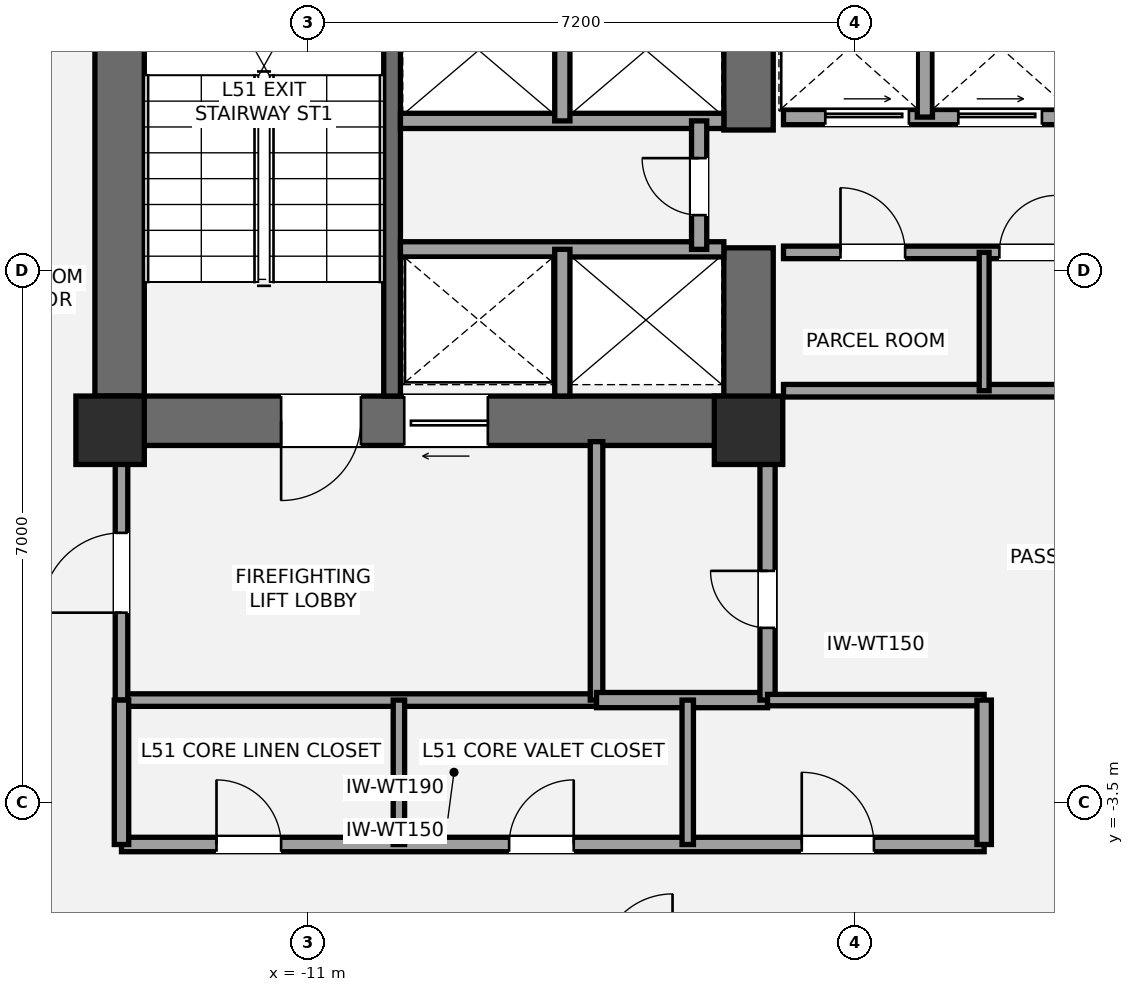
"""IFC4 building model, lengths in metres.
Left out: names, types, materials, properties, quantities, classifications, styles, units other than length and angle.
Written with IfcOpenShell. Run it as: python <this file> out.ifc"""

import sys

from ifc_helpers import new_model, si_unit, direction, frame, frame_2d, origin, origin_2d, place, context, subcontext, project, spatial, rectangle, extrude, element, fill, save


model = new_model("IFC4")
c1 = context("Model", 3, precision=1e-05, world=origin(), true_north=direction((0.0, 1.0)))
c2 = subcontext(c1, "Body", "Model", "MODEL_VIEW")
j1 = project(units=[si_unit("LENGTHUNIT", "METRE"), si_unit("PLANEANGLEUNIT", "RADIAN")], contexts=[c1])
p1 = place(None, origin())
s1 = spatial("IfcSite", under=j1, at=p1, CompositionType="ELEMENT")
p2 = place(p1, origin())
s2 = spatial("IfcBuilding", under=s1, at=p2, CompositionType="ELEMENT")
p3 = place(p2, frame((0.0, 0.0, 185.4)))
s3 = spatial("IfcBuildingStorey", under=s2, at=p3, CompositionType="ELEMENT", Elevation=185.4)
p4 = place(p3, frame((-13.475, 1.2, 0.0), z_axis=(0.0, 0.0, 1.0), x_axis=(0.0, 1.0, 0.0)))
e1 = element("IfcWall", 1, at=p4, inside=s3, PredefinedType="SHEAR", context=c2, shape_type="SweptSolid", body=[
    extrude(rectangle(XDim=8.45, YDim=0.65, at=frame_2d((4.225, 0.0))), origin(), (0.0, 0.0, 1.0), 3.2),
])
p5 = place(p3, frame((-4.875, 1.525, 0.0), z_axis=(0.0, 0.0, 1.0), x_axis=(-1.0, 0.0, 0.0)))
e2 = element("IfcWall", 2, at=p5, inside=s3, PredefinedType="SHEAR", context=c2, shape_type="SweptSolid", body=[
    extrude(rectangle(XDim=8.925, YDim=0.65, at=frame_2d((4.462, 0.0))), origin(), (0.0, 0.0, 1.0), 3.2),
])
p6 = place(p5, frame((5.425, 0.0, 0.0)))
e3 = element("IfcOpeningElement", 3, at=p6, cuts=e2, PredefinedType="OPENING", context=c2, shape_type="SweptSolid", body=[
    extrude(rectangle(XDim=1.05, YDim=2.15, at=frame_2d((0.525, 1.075))), frame((0.0, 0.335, 0.0), z_axis=(0.0, -1.0, 0.0), x_axis=(1.0, 0.0, 0.0)), (0.0, 0.0, 1.0), 0.67),
])
p7 = place(p5, frame((3.755, 0.0, 0.0)))
e4 = element("IfcOpeningElement", 4, at=p7, cuts=e2, PredefinedType="OPENING", context=c2, shape_type="SweptSolid", body=[
    extrude(rectangle(XDim=1.1, YDim=2.2, at=frame_2d((0.55, 1.1))), frame((0.0, 0.335, 0.0), z_axis=(0.0, -1.0, 0.0), x_axis=(1.0, 0.0, 0.0)), (0.0, 0.0, 1.0), 0.67),
])
p8 = place(p3, frame((-5.2, 1.2, 0.0), z_axis=(0.0, 0.0, 1.0), x_axis=(0.0, 1.0, 0.0)))
e5 = element("IfcWall", 5, at=p8, inside=s3, PredefinedType="SHEAR", context=c2, shape_type="SweptSolid", body=[
    extrude(rectangle(XDim=2.6, YDim=0.65, at=frame_2d((1.3, 0.0))), origin(), (0.0, 0.0, 1.0), 3.2),
])
p9 = place(p3, frame((-5.2, 5.35, 0.0), z_axis=(0.0, 0.0, 1.0), x_axis=(0.0, 1.0, 0.0)))
e6 = element("IfcWall", 6, at=p9, inside=s3, PredefinedType="SHEAR", context=c2, shape_type="SweptSolid", body=[
    extrude(rectangle(XDim=2.0, YDim=0.65, at=frame_2d((1.0, 0.0))), origin(), (0.0, 0.0, 1.0), 3.2),
])
p10 = place(p3, frame((-9.89, 1.85, 0.0), z_axis=(0.0, 0.0, 1.0), x_axis=(0.0, 1.0, 0.0)))
e7 = element("IfcWall", 7, at=p10, inside=s3, PredefinedType="SHEAR", context=c2, shape_type="SweptSolid", body=[
    extrude(rectangle(XDim=7.15, YDim=0.22, at=frame_2d((3.575, 0.0))), origin(), (0.0, 0.0, 1.0), 3.2),
])
for number, where, z_axis, x_axis in (
    (8, (-13.6, 1.4, 0.0), (0.0, 0.0, 1.0), (1.0, 0.0, 0.0)),
    (9, (-5.2, 1.4, 0.0), (0.0, 0.0, 1.0), (1.0, 0.0, 0.0)),
):
    element("IfcColumn", number, at=place(p3, frame(where, z_axis=z_axis, x_axis=x_axis)), inside=s3, PredefinedType="COLUMN", context=c2, shape_type="SweptSolid", body=[
        extrude(rectangle(XDim=0.9, YDim=0.9, at=origin_2d()), origin(), (0.0, 0.0, 1.0), 3.2),
    ])
p11 = place(p3, frame((-13.45, -2.15, 0.0), z_axis=(0.0, 0.0, 1.0), x_axis=(1.0, 0.0, 0.0)))
e10 = element("IfcWall", 10, at=p11, inside=s3, PredefinedType="PARTITIONING", context=c2, shape_type="SweptSolid", body=[
    extrude(rectangle(XDim=6.25, YDim=0.165, at=frame_2d((3.125, 0.0))), origin(), (0.0, 0.0, 1.0), 3.02),
])
p12 = place(p3, frame((-13.45, -2.15, 0.0), z_axis=(0.0, 0.0, 1.0), x_axis=(0.0, 1.0, 0.0)))
e11 = element("IfcWall", 11, at=p12, inside=s3, PredefinedType="PARTITIONING", context=c2, shape_type="SweptSolid", body=[
    extrude(rectangle(XDim=3.4, YDim=0.165, at=frame_2d((1.7, 0.0))), origin(), (0.0, 0.0, 1.0), 2.473),
])
p13 = place(p12, frame((1.15, 0.0, 0.0)))
e12 = element("IfcOpeningElement", 12, at=p13, cuts=e11, PredefinedType="OPENING", context=c2, shape_type="SweptSolid", body=[
    extrude(rectangle(XDim=1.05, YDim=2.15, at=frame_2d((0.525, 1.075))), frame((0.0, 0.093, 0.0), z_axis=(0.0, -1.0, 0.0), x_axis=(1.0, 0.0, 0.0)), (0.0, 0.0, 1.0), 0.185),
])
p14 = place(p3, frame((-7.2, -2.15, 0.0), z_axis=(0.0, 0.0, 1.0), x_axis=(0.0, 1.0, 0.0)))
e13 = element("IfcWall", 13, at=p14, inside=s3, PredefinedType="PARTITIONING", context=c2, shape_type="SweptSolid", body=[
    extrude(rectangle(XDim=3.4, YDim=0.165, at=frame_2d((1.7, 0.0))), origin(), (0.0, 0.0, 1.0), 2.473),
])
p15 = place(p3, frame((-7.2, -2.15, 0.0), z_axis=(0.0, 0.0, 1.0), x_axis=(1.0, 0.0, 0.0)))
e14 = element("IfcWall", 14, at=p15, inside=s3, PredefinedType="SOLIDWALL", context=c2, shape_type="SweptSolid", body=[
    extrude(rectangle(XDim=2.25, YDim=0.2, at=frame_2d((1.125, 0.0))), origin(), (0.0, 0.0, 1.0), 3.02),
])
p16 = place(p3, frame((-4.95, -2.15, 0.0), z_axis=(0.0, 0.0, 1.0), x_axis=(0.0, 1.0, 0.0)))
e15 = element("IfcWall", 15, at=p16, inside=s3, PredefinedType="SOLIDWALL", context=c2, shape_type="SweptSolid", body=[
    extrude(rectangle(XDim=3.4, YDim=0.2, at=frame_2d((1.7, 0.0))), origin(), (0.0, 0.0, 1.0), 2.473),
])
p17 = place(p16, frame((0.95, 0.0, 0.0)))
e16 = element("IfcOpeningElement", 16, at=p17, cuts=e15, PredefinedType="OPENING", context=c2, shape_type="SweptSolid", body=[
    extrude(rectangle(XDim=0.75, YDim=2.1, at=frame_2d((0.375, 1.05))), frame((0.0, 0.11, 0.0), z_axis=(0.0, -1.0, 0.0), x_axis=(1.0, 0.0, 0.0)), (0.0, 0.0, 1.0), 0.22),
])
p18 = place(p3, frame((-9.78, 3.78, 0.0), z_axis=(0.0, 0.0, 1.0), x_axis=(1.0, 0.0, 0.0)))
e17 = element("IfcWall", 17, at=p18, inside=s3, PredefinedType="SOLIDWALL", context=c2, shape_type="SweptSolid", body=[
    extrude(rectangle(XDim=4.255, YDim=0.2, at=frame_2d((2.127, 0.0))), origin(), (0.0, 0.0, 1.0), 3.02),
])
p19 = place(p3, frame((-7.65, 1.85, 0.0), z_axis=(0.0, 0.0, 1.0), x_axis=(0.0, 1.0, 0.0)))
e18 = element("IfcWall", 18, at=p19, inside=s3, PredefinedType="SOLIDWALL", context=c2, shape_type="SweptSolid", body=[
    extrude(rectangle(XDim=1.93, YDim=0.2, at=frame_2d((0.965, 0.0))), origin(), (0.0, 0.0, 1.0), 3.02),
])
p20 = place(p3, frame((-9.78, 5.47, 0.0), z_axis=(0.0, 0.0, 1.0), x_axis=(1.0, 0.0, 0.0)))
e19 = element("IfcWall", 19, at=p20, inside=s3, PredefinedType="SOLIDWALL", context=c2, shape_type="SweptSolid", body=[
    extrude(rectangle(XDim=4.255, YDim=0.2, at=frame_2d((2.127, 0.0))), origin(), (0.0, 0.0, 1.0), 3.02),
])
p21 = place(p3, frame((-7.65, 5.47, 0.0), z_axis=(0.0, 0.0, 1.0), x_axis=(0.0, 1.0, 0.0)))
e20 = element("IfcWall", 20, at=p21, inside=s3, PredefinedType="SOLIDWALL", context=c2, shape_type="SweptSolid", body=[
    extrude(rectangle(XDim=1.86, YDim=0.2, at=frame_2d((0.93, 0.0))), origin(), (0.0, 0.0, 1.0), 3.02),
])
p22 = place(p3, frame((-5.85, 3.78, 0.0), z_axis=(0.0, 0.0, 1.0), x_axis=(0.0, 1.0, 0.0)))
e21 = element("IfcWall", 21, at=p22, inside=s3, PredefinedType="SOLIDWALL", context=c2, shape_type="SweptSolid", body=[
    extrude(rectangle(XDim=1.69, YDim=0.2, at=frame_2d((0.845, 0.0))), origin(), (0.0, 0.0, 1.0), 3.02),
])
p23 = place(p22, frame((0.45, 0.0, 0.0)))
e22 = element("IfcOpeningElement", 22, at=p23, cuts=e21, PredefinedType="OPENING", context=c2, shape_type="SweptSolid", body=[
    extrude(rectangle(XDim=0.75, YDim=2.1, at=frame_2d((0.375, 1.05))), frame((0.0, 0.11, 0.0), z_axis=(0.0, -1.0, 0.0), x_axis=(1.0, 0.0, 0.0)), (0.0, 0.0, 1.0), 0.22),
])
p24 = place(p3, frame((-4.74, 1.92, 0.0), z_axis=(0.0, 0.0, 1.0), x_axis=(1.0, 0.0, 0.0)))
e23 = element("IfcWall", 23, at=p24, inside=s3, PredefinedType="PARTITIONING", context=c2, shape_type="SweptSolid", body=[
    extrude(rectangle(XDim=3.89, YDim=0.165, at=frame_2d((1.945, 0.0))), origin(), (0.0, 0.0, 1.0), 2.16),
])
p25 = place(p3, frame((-4.74, 3.74, 0.0), z_axis=(0.0, 0.0, 1.0), x_axis=(1.0, 0.0, 0.0)))
e24 = element("IfcWall", 24, at=p25, inside=s3, PredefinedType="PARTITIONING", context=c2, shape_type="SweptSolid", body=[
    extrude(rectangle(XDim=3.89, YDim=0.165, at=frame_2d((1.945, 0.0))), origin(), (0.0, 0.0, 1.0), 3.02),
])
p26 = place(p25, frame((0.75, 0.0, 0.0)))
e25 = element("IfcOpeningElement", 25, at=p26, cuts=e24, PredefinedType="OPENING", context=c2, shape_type="SweptSolid", body=[
    extrude(rectangle(XDim=0.85, YDim=2.1, at=frame_2d((0.425, 1.05))), frame((0.0, 0.093, 0.0), z_axis=(0.0, -1.0, 0.0), x_axis=(1.0, 0.0, 0.0)), (0.0, 0.0, 1.0), 0.185),
])
p27 = place(p25, frame((2.84, 0.0, 0.0)))
e26 = element("IfcOpeningElement", 26, at=p27, cuts=e24, PredefinedType="OPENING", context=c2, shape_type="SweptSolid", body=[
    extrude(rectangle(XDim=0.75, YDim=2.1, at=frame_2d((0.375, 1.05))), frame((0.0, 0.093, 0.0), z_axis=(0.0, -1.0, 0.0), x_axis=(1.0, 0.0, 0.0)), (0.0, 0.0, 1.0), 0.185),
])
p28 = place(p3, frame((-2.1, 1.92, 0.0), z_axis=(0.0, 0.0, 1.0), x_axis=(0.0, 1.0, 0.0)))
e27 = element("IfcWall", 27, at=p28, inside=s3, PredefinedType="PARTITIONING", context=c2, shape_type="SweptSolid", body=[
    extrude(rectangle(XDim=1.82, YDim=0.13, at=frame_2d((0.91, 0.0))), origin(), (0.0, 0.0, 1.0), 3.02),
])
p29 = place(p3, frame((-4.74, 5.52, 0.0), z_axis=(0.0, 0.0, 1.0), x_axis=(1.0, 0.0, 0.0)))
e28 = element("IfcWall", 28, at=p29, inside=s3, PredefinedType="SOLIDWALL", context=c2, shape_type="SweptSolid", body=[
    extrude(rectangle(XDim=3.86, YDim=0.2, at=frame_2d((1.93, 0.0))), origin(), (0.0, 0.0, 1.0), 3.02),
])
p30 = place(p29, frame((0.55, 0.0, 0.0)))
e29 = element("IfcOpeningElement", 29, at=p30, cuts=e28, PredefinedType="OPENING", context=c2, shape_type="SweptSolid", body=[
    extrude(rectangle(XDim=1.1, YDim=2.2, at=frame_2d((0.55, 1.1))), frame((0.0, 0.11, 0.0), z_axis=(0.0, -1.0, 0.0), x_axis=(1.0, 0.0, 0.0)), (0.0, 0.0, 1.0), 0.22),
])
p31 = place(p29, frame((2.3, 0.0, 0.0)))
e30 = element("IfcOpeningElement", 30, at=p31, cuts=e28, PredefinedType="OPENING", context=c2, shape_type="SweptSolid", body=[
    extrude(rectangle(XDim=1.1, YDim=2.2, at=frame_2d((0.55, 1.1))), frame((0.0, 0.11, 0.0), z_axis=(0.0, -1.0, 0.0), x_axis=(1.0, 0.0, 0.0)), (0.0, 0.0, 1.0), 0.22),
])
p32 = place(p3, frame((-2.88, 5.52, 0.0), z_axis=(0.0, 0.0, 1.0), x_axis=(0.0, 1.0, 0.0)))
e31 = element("IfcWall", 31, at=p32, inside=s3, PredefinedType="SOLIDWALL", context=c2, shape_type="SweptSolid", body=[
    extrude(rectangle(XDim=1.81, YDim=0.2, at=frame_2d((0.905, 0.0))), origin(), (0.0, 0.0, 1.0), 3.02),
])
p33 = place(p3, frame((-13.45, -4.05, 0.0), z_axis=(0.0, 0.0, 1.0), x_axis=(1.0, 0.0, 0.0)))
e32 = element("IfcWall", 32, at=p33, inside=s3, PredefinedType="PLUMBINGWALL", context=c2, shape_type="SweptSolid", body=[
    extrude(rectangle(XDim=11.35, YDim=0.19, at=frame_2d((5.675, 0.0))), origin(), (0.0, 0.0, 1.0), 2.473),
])
p34 = place(p33, frame((1.25, 0.0, 0.0)))
e33 = element("IfcOpeningElement", 33, at=p34, cuts=e32, PredefinedType="OPENING", context=c2, shape_type="SweptSolid", body=[
    extrude(rectangle(XDim=0.85, YDim=2.1, at=frame_2d((0.425, 1.05))), frame((0.0, 0.105, 0.0), z_axis=(0.0, -1.0, 0.0), x_axis=(1.0, 0.0, 0.0)), (0.0, 0.0, 1.0), 0.21),
])
p35 = place(p33, frame((5.1, 0.0, 0.0)))
e34 = element("IfcOpeningElement", 34, at=p35, cuts=e32, PredefinedType="OPENING", context=c2, shape_type="SweptSolid", body=[
    extrude(rectangle(XDim=0.85, YDim=2.1, at=frame_2d((0.425, 1.05))), frame((0.0, 0.105, 0.0), z_axis=(0.0, -1.0, 0.0), x_axis=(1.0, 0.0, 0.0)), (0.0, 0.0, 1.0), 0.21),
])
p36 = place(p33, frame((8.95, 0.0, 0.0)))
e35 = element("IfcOpeningElement", 35, at=p36, cuts=e32, PredefinedType="OPENING", context=c2, shape_type="SweptSolid", body=[
    extrude(rectangle(XDim=0.95, YDim=2.15, at=frame_2d((0.475, 1.075))), frame((0.0, 0.105, 0.0), z_axis=(0.0, -1.0, 0.0), x_axis=(1.0, 0.0, 0.0)), (0.0, 0.0, 1.0), 0.21),
])
p37 = place(p3, frame((-4.95, -2.15, 0.0), z_axis=(0.0, 0.0, 1.0), x_axis=(1.0, 0.0, 0.0)))
e36 = element("IfcWall", 36, at=p37, inside=s3, PredefinedType="PLUMBINGWALL", context=c2, shape_type="SweptSolid", body=[
    extrude(rectangle(XDim=2.85, YDim=0.15, at=frame_2d((1.425, 0.0))), origin(), (0.0, 0.0, 1.0), 2.473),
])
p38 = place(p3, frame((-13.45, -4.05, 0.0), z_axis=(0.0, 0.0, 1.0), x_axis=(0.0, 1.0, 0.0)))
e37 = element("IfcWall", 37, at=p38, inside=s3, PredefinedType="PLUMBINGWALL", context=c2, shape_type="SweptSolid", body=[
    extrude(rectangle(XDim=1.9, YDim=0.19, at=frame_2d((0.95, 0.0))), origin(), (0.0, 0.0, 1.0), 2.473),
])
p39 = place(p3, frame((-2.1, -4.05, 0.0), z_axis=(0.0, 0.0, 1.0), x_axis=(0.0, 1.0, 0.0)))
e38 = element("IfcWall", 38, at=p39, inside=s3, PredefinedType="PLUMBINGWALL", context=c2, shape_type="SweptSolid", body=[
    extrude(rectangle(XDim=1.9, YDim=0.19, at=frame_2d((0.95, 0.0))), origin(), (0.0, 0.0, 1.0), 3.02),
])
for number, where, z_axis, x_axis in (
    (39, (-9.8, -4.05, 0.0), (0.0, 0.0, 1.0), (0.0, 1.0, 0.0)),
    (40, (-6.0, -4.05, 0.0), (0.0, 0.0, 1.0), (0.0, 1.0, 0.0)),
):
    element("IfcWall", number, at=place(p3, frame(where, z_axis=z_axis, x_axis=x_axis)), inside=s3, PredefinedType="PLUMBINGWALL", context=c2, shape_type="SweptSolid", body=[
        extrude(rectangle(XDim=1.9, YDim=0.15, at=frame_2d((0.95, 0.0))), origin(), (0.0, 0.0, 1.0), 2.473),
    ])
p40 = place(p6, origin())
e41 = element("IfcDoor", 41, at=p40, inside=s3, OperationType="SINGLE_SWING_RIGHT", PredefinedType="DOOR", context=c2, shape_type="SweptSolid", body=[
    extrude(rectangle(XDim=1.05, YDim=2.15, at=frame_2d((0.525, 1.075))), frame((0.0, 0.025, 0.0), z_axis=(0.0, -1.0, 0.0), x_axis=(1.0, 0.0, 0.0)), (0.0, 0.0, 1.0), 0.05),
])
fill(e3, e41)
p41 = place(p13, origin())
e42 = element("IfcDoor", 42, at=p41, inside=s3, OperationType="SINGLE_SWING_LEFT", PredefinedType="DOOR", context=c2, shape_type="SweptSolid", body=[
    extrude(rectangle(XDim=1.05, YDim=2.15, at=frame_2d((0.525, 1.075))), frame((0.0, 0.025, 0.0), z_axis=(0.0, -1.0, 0.0), x_axis=(1.0, 0.0, 0.0)), (0.0, 0.0, 1.0), 0.05),
])
fill(e12, e42)
p42 = place(p17, origin())
e43 = element("IfcDoor", 43, at=p42, inside=s3, OperationType="SINGLE_SWING_RIGHT", PredefinedType="DOOR", context=c2, shape_type="SweptSolid", body=[
    extrude(rectangle(XDim=0.75, YDim=2.1, at=frame_2d((0.375, 1.05))), frame((0.0, 0.025, 0.0), z_axis=(0.0, -1.0, 0.0), x_axis=(1.0, 0.0, 0.0)), (0.0, 0.0, 1.0), 0.05),
])
fill(e16, e43)
p43 = place(p7, origin())
e44 = element("IfcDoor", 44, at=p43, inside=s3, OperationType="SLIDING_TO_LEFT", PredefinedType="DOOR", context=c2, shape_type="SweptSolid", body=[
    extrude(rectangle(XDim=1.1, YDim=2.2, at=frame_2d((0.55, 1.1))), frame((0.0, 0.025, 0.0), z_axis=(0.0, -1.0, 0.0), x_axis=(1.0, 0.0, 0.0)), (0.0, 0.0, 1.0), 0.05),
])
fill(e4, e44)
p44 = place(p23, origin())
e45 = element("IfcDoor", 45, at=p44, inside=s3, OperationType="SINGLE_SWING_RIGHT", PredefinedType="DOOR", context=c2, shape_type="SweptSolid", body=[
    extrude(rectangle(XDim=0.75, YDim=2.1, at=frame_2d((0.375, 1.05))), frame((0.0, 0.025, 0.0), z_axis=(0.0, -1.0, 0.0), x_axis=(1.0, 0.0, 0.0)), (0.0, 0.0, 1.0), 0.05),
])
fill(e22, e45)
p45 = place(p26, origin())
e46 = element("IfcDoor", 46, at=p45, inside=s3, OperationType="SINGLE_SWING_LEFT", PredefinedType="DOOR", context=c2, shape_type="SweptSolid", body=[
    extrude(rectangle(XDim=0.85, YDim=2.1, at=frame_2d((0.425, 1.05))), frame((0.0, 0.025, 0.0), z_axis=(0.0, -1.0, 0.0), x_axis=(1.0, 0.0, 0.0)), (0.0, 0.0, 1.0), 0.05),
])
fill(e25, e46)
p46 = place(p27, origin())
e47 = element("IfcDoor", 47, at=p46, inside=s3, OperationType="SINGLE_SWING_RIGHT", PredefinedType="DOOR", context=c2, shape_type="SweptSolid", body=[
    extrude(rectangle(XDim=0.75, YDim=2.1, at=frame_2d((0.375, 1.05))), frame((0.0, 0.025, 0.0), z_axis=(0.0, -1.0, 0.0), x_axis=(1.0, 0.0, 0.0)), (0.0, 0.0, 1.0), 0.05),
])
fill(e26, e47)
p47 = place(p30, origin())
e48 = element("IfcDoor", 48, at=p47, inside=s3, OperationType="SLIDING_TO_LEFT", PredefinedType="DOOR", context=c2, shape_type="SweptSolid", body=[
    extrude(rectangle(XDim=1.1, YDim=2.2, at=frame_2d((0.55, 1.1))), frame((0.0, 0.025, 0.0), z_axis=(0.0, -1.0, 0.0), x_axis=(1.0, 0.0, 0.0)), (0.0, 0.0, 1.0), 0.05),
])
fill(e29, e48)
p48 = place(p31, origin())
e49 = element("IfcDoor", 49, at=p48, inside=s3, OperationType="SLIDING_TO_LEFT", PredefinedType="DOOR", context=c2, shape_type="SweptSolid", body=[
    extrude(rectangle(XDim=1.1, YDim=2.2, at=frame_2d((0.55, 1.1))), frame((0.0, 0.025, 0.0), z_axis=(0.0, -1.0, 0.0), x_axis=(1.0, 0.0, 0.0)), (0.0, 0.0, 1.0), 0.05),
])
fill(e30, e49)
p49 = place(p34, origin())
e50 = element("IfcDoor", 50, at=p49, inside=s3, OperationType="SINGLE_SWING_LEFT", PredefinedType="DOOR", context=c2, shape_type="SweptSolid", body=[
    extrude(rectangle(XDim=0.85, YDim=2.1, at=frame_2d((0.425, 1.05))), frame((0.0, 0.025, 0.0), z_axis=(0.0, -1.0, 0.0), x_axis=(1.0, 0.0, 0.0)), (0.0, 0.0, 1.0), 0.05),
])
fill(e33, e50)
p50 = place(p35, origin())
e51 = element("IfcDoor", 51, at=p50, inside=s3, OperationType="SINGLE_SWING_RIGHT", PredefinedType="DOOR", context=c2, shape_type="SweptSolid", body=[
    extrude(rectangle(XDim=0.85, YDim=2.1, at=frame_2d((0.425, 1.05))), frame((0.0, 0.025, 0.0), z_axis=(0.0, -1.0, 0.0), x_axis=(1.0, 0.0, 0.0)), (0.0, 0.0, 1.0), 0.05),
])
fill(e34, e51)
p51 = place(p36, origin())
e52 = element("IfcDoor", 52, at=p51, inside=s3, OperationType="SINGLE_SWING_LEFT", PredefinedType="DOOR", context=c2, shape_type="SweptSolid", body=[
    extrude(rectangle(XDim=0.95, YDim=2.15, at=frame_2d((0.475, 1.075))), frame((0.0, 0.025, 0.0), z_axis=(0.0, -1.0, 0.0), x_axis=(1.0, 0.0, 0.0)), (0.0, 0.0, 1.0), 0.05),
])
fill(e35, e52)
save(model, sys.argv[1])
